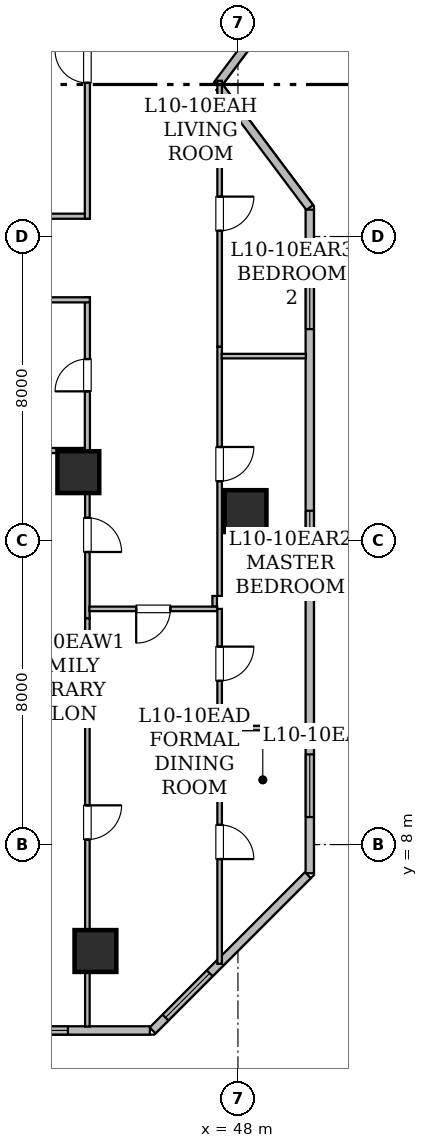
"""IFC4 building model, lengths in metres.
Left out: names, types, materials, properties, quantities, classifications, styles, units other than length and angle.
Written with IfcOpenShell. Run it as: python <this file> out.ifc"""

import sys

from ifc_helpers import new_model, si_unit, direction, frame, frame_2d, origin, origin_2d, place, context, subcontext, project, spatial, rectangle, hollow_rectangle, extrude, element, fill, save


model = new_model("IFC4")
c1 = context("Model", 3, precision=1e-05, world=origin(), true_north=direction((0.0, 1.0)))
c2 = subcontext(c1, "Body", "Model", "MODEL_VIEW")
j1 = project(units=[si_unit("LENGTHUNIT", "METRE"), si_unit("PLANEANGLEUNIT", "RADIAN")], contexts=[c1])
p1 = place(None, origin())
s1 = spatial("IfcSite", under=j1, at=p1, CompositionType="ELEMENT")
p2 = place(p1, origin())
s2 = spatial("IfcBuilding", under=s1, at=p2, CompositionType="ELEMENT")
p3 = place(p2, frame((0.0, 0.0, 44.25)))
s3 = spatial("IfcBuildingStorey", under=s2, at=p3, CompositionType="ELEMENT", Elevation=44.25)
for number, where, z_axis, x_axis in (
    (1, (44.25, 5.2, 0.0), (0.0, 0.0, 1.0), (1.0, 0.0, 0.0)),
    (2, (48.2, 16.775, 0.0), (0.0, 0.0, 1.0), (1.0, 0.0, 0.0)),
    (3, (43.8, 17.8, 0.0), (0.0, 0.0, 1.0), (1.0, 0.0, 0.0)),
):
    element("IfcColumn", number, at=place(p3, frame(where, z_axis=z_axis, x_axis=x_axis)), inside=s3, PredefinedType="COLUMN", context=c2, shape_type="SweptSolid", body=[
        extrude(hollow_rectangle(XDim=1.1, YDim=1.1, WallThickness=0.055, at=origin_2d()), origin(), (0.0, 0.0, 1.0), 3.65),
    ])
p4 = place(p3, frame((49.856, 31.191, 0.0), z_axis=(0.0, 0.0, 1.0), x_axis=(-0.600137081448, -0.799897170561, 0.0)))
e4 = element("IfcWall", 4, at=p4, inside=s3, PredefinedType="STANDARD", context=c2, shape_type="SweptSolid", body=[
    extrude(rectangle(XDim=3.989, YDim=0.22, at=frame_2d((1.995, 0.0))), origin(), (0.0, 0.0, 1.0), 3.43),
])
p5 = place(p3, frame((47.519, 27.923, 0.0), z_axis=(0.0, 0.0, 1.0), x_axis=(0.600118645218, -0.799911002338, 0.0)))
e5 = element("IfcWall", 5, at=p5, inside=s3, PredefinedType="STANDARD", context=c2, shape_type="SweptSolid", body=[
    extrude(rectangle(XDim=3.951, YDim=0.22, at=frame_2d((1.975, 0.0))), origin(), (0.0, 0.0, 1.0), 3.43),
])
p6 = place(p3, frame((49.89, 24.707, 0.0), z_axis=(0.0, 0.0, 1.0), x_axis=(0.0, -1.0, 0.0)))
e6 = element("IfcWall", 6, at=p6, inside=s3, PredefinedType="STANDARD", context=c2, shape_type="SweptSolid", body=[
    extrude(rectangle(XDim=17.461, YDim=0.22, at=frame_2d((8.73, 0.0))), origin(), (0.0, 0.0, 1.0), 3.43),
])
p7 = place(p6, frame((14.333, 0.0, 0.85)))
e7 = element("IfcOpeningElement", 7, at=p7, cuts=e6, PredefinedType="OPENING", context=c2, shape_type="SweptSolid", body=[
    extrude(rectangle(XDim=1.65, YDim=1.55, at=frame_2d((0.825, 0.775))), frame((0.0, 0.12, 0.0), z_axis=(0.0, -1.0, 0.0), x_axis=(1.0, 0.0, 0.0)), (0.0, 0.0, 1.0), 0.24),
])
p8 = place(p6, frame((7.922, 0.0, 0.85)))
e8 = element("IfcOpeningElement", 8, at=p8, cuts=e6, PredefinedType="OPENING", context=c2, shape_type="SweptSolid", body=[
    extrude(rectangle(XDim=1.65, YDim=1.55, at=frame_2d((0.825, 0.775))), frame((0.0, 0.12, 0.0), z_axis=(0.0, -1.0, 0.0), x_axis=(1.0, 0.0, 0.0)), (0.0, 0.0, 1.0), 0.24),
])
p9 = place(p6, frame((1.494, 0.0, 0.85)))
e9 = element("IfcOpeningElement", 9, at=p9, cuts=e6, PredefinedType="OPENING", context=c2, shape_type="SweptSolid", body=[
    extrude(rectangle(XDim=1.65, YDim=1.55, at=frame_2d((0.825, 0.775))), frame((0.0, 0.12, 0.0), z_axis=(0.0, -1.0, 0.0), x_axis=(1.0, 0.0, 0.0)), (0.0, 0.0, 1.0), 0.24),
])
p10 = place(p3, frame((49.84, 7.196, 0.0), z_axis=(0.0, 0.0, 1.0), x_axis=(-0.707127905562, -0.70708565618, 0.0)))
e10 = element("IfcWall", 10, at=p10, inside=s3, PredefinedType="STANDARD", context=c2, shape_type="SweptSolid", body=[
    extrude(rectangle(XDim=5.779, YDim=0.22, at=frame_2d((2.889, 0.0))), origin(), (0.0, 0.0, 1.0), 3.43),
])
p11 = place(p10, frame((3.651, 0.0, 0.85)))
e11 = element("IfcOpeningElement", 11, at=p11, cuts=e10, PredefinedType="OPENING", context=c2, shape_type="SweptSolid", body=[
    extrude(rectangle(XDim=1.65, YDim=1.55, at=frame_2d((0.825, 0.775))), frame((0.0, 0.12, 0.0), z_axis=(0.0, -1.0, 0.0), x_axis=(1.0, 0.0, 0.0)), (0.0, 0.0, 1.0), 0.24),
])
p12 = place(p3, frame((45.683, 3.11, 0.0), z_axis=(0.0, 0.0, 1.0), x_axis=(-1.0, 0.0, 0.0)))
e12 = element("IfcWall", 12, at=p12, inside=s3, PredefinedType="STANDARD", context=c2, shape_type="SweptSolid", body=[
    extrude(rectangle(XDim=37.368, YDim=0.22, at=frame_2d((18.684, 0.0))), origin(), (0.0, 0.0, 1.0), 3.43),
])
p13 = place(p12, frame((14.508, 0.0, 0.85)))
e13 = element("IfcOpeningElement", 13, at=p13, cuts=e12, PredefinedType="OPENING", context=c2, shape_type="SweptSolid", body=[
    extrude(rectangle(XDim=1.65, YDim=1.55, at=frame_2d((0.825, 0.775))), frame((0.0, 0.12, 0.0), z_axis=(0.0, -1.0, 0.0), x_axis=(1.0, 0.0, 0.0)), (0.0, 0.0, 1.0), 0.24),
])
p14 = place(p12, frame((33.025, 0.0, 0.85)))
e14 = element("IfcOpeningElement", 14, at=p14, cuts=e12, PredefinedType="OPENING", context=c2, shape_type="SweptSolid", body=[
    extrude(rectangle(XDim=1.65, YDim=1.55, at=frame_2d((0.825, 0.775))), frame((0.0, 0.12, 0.0), z_axis=(0.0, -1.0, 0.0), x_axis=(1.0, 0.0, 0.0)), (0.0, 0.0, 1.0), 0.24),
])
p15 = place(p12, frame((24.713, 0.0, 0.8)))
e15 = element("IfcOpeningElement", 15, at=p15, cuts=e12, PredefinedType="OPENING", context=c2, shape_type="SweptSolid", body=[
    extrude(rectangle(XDim=1.2, YDim=1.5, at=frame_2d((0.6, 0.75))), frame((0.0, 0.12, 0.0), z_axis=(0.0, -1.0, 0.0), x_axis=(1.0, 0.0, 0.0)), (0.0, 0.0, 1.0), 0.24),
])
p16 = place(p12, frame((28.113, 0.0, 0.85)))
e16 = element("IfcOpeningElement", 16, at=p16, cuts=e12, PredefinedType="OPENING", context=c2, shape_type="SweptSolid", body=[
    extrude(rectangle(XDim=1.65, YDim=1.55, at=frame_2d((0.825, 0.775))), frame((0.0, 0.12, 0.0), z_axis=(0.0, -1.0, 0.0), x_axis=(1.0, 0.0, 0.0)), (0.0, 0.0, 1.0), 0.24),
])
p17 = place(p12, frame((20.863, 0.0, 0.85)))
e17 = element("IfcOpeningElement", 17, at=p17, cuts=e12, PredefinedType="OPENING", context=c2, shape_type="SweptSolid", body=[
    extrude(rectangle(XDim=1.65, YDim=1.55, at=frame_2d((0.825, 0.775))), frame((0.0, 0.12, 0.0), z_axis=(0.0, -1.0, 0.0), x_axis=(1.0, 0.0, 0.0)), (0.0, 0.0, 1.0), 0.24),
])
p18 = place(p12, frame((10.428, 0.0, 0.8)))
e18 = element("IfcOpeningElement", 18, at=p18, cuts=e12, PredefinedType="OPENING", context=c2, shape_type="SweptSolid", body=[
    extrude(rectangle(XDim=1.2, YDim=1.5, at=frame_2d((0.6, 0.75))), frame((0.0, 0.12, 0.0), z_axis=(0.0, -1.0, 0.0), x_axis=(1.0, 0.0, 0.0)), (0.0, 0.0, 1.0), 0.24),
])
p19 = place(p12, frame((6.453, 0.0, 0.85)))
e19 = element("IfcOpeningElement", 19, at=p19, cuts=e12, PredefinedType="OPENING", context=c2, shape_type="SweptSolid", body=[
    extrude(rectangle(XDim=1.65, YDim=1.55, at=frame_2d((0.825, 0.775))), frame((0.0, 0.12, 0.0), z_axis=(0.0, -1.0, 0.0), x_axis=(1.0, 0.0, 0.0)), (0.0, 0.0, 1.0), 0.24),
])
p20 = place(p12, frame((2.157, 0.0, 0.85)))
e20 = element("IfcOpeningElement", 20, at=p20, cuts=e12, PredefinedType="OPENING", context=c2, shape_type="SweptSolid", body=[
    extrude(rectangle(XDim=1.65, YDim=1.55, at=frame_2d((0.825, 0.775))), frame((0.0, 0.12, 0.0), z_axis=(0.0, -1.0, 0.0), x_axis=(1.0, 0.0, 0.0)), (0.0, 0.0, 1.0), 0.24),
])
p21 = place(p3, frame((44.038, 18.304, 0.0), z_axis=(0.0, 0.0, 1.0), x_axis=(0.0, -1.0, 0.0)))
e21 = element("IfcWall", 21, at=p21, inside=s3, PredefinedType="PARTITIONING", context=c2, shape_type="SweptSolid", body=[
    extrude(rectangle(XDim=4.351, YDim=0.12, at=frame_2d((2.176, 0.0))), origin(), (0.0, 0.0, 1.0), 2.647),
])
p22 = place(p21, frame((1.705, 0.0, 0.0)))
e22 = element("IfcOpeningElement", 22, at=p22, cuts=e21, PredefinedType="OPENING", context=c2, shape_type="SweptSolid", body=[
    extrude(rectangle(XDim=0.9, YDim=2.1, at=frame_2d((0.45, 1.05))), frame((0.0, 0.07, 0.0), z_axis=(0.0, -1.0, 0.0), x_axis=(1.0, 0.0, 0.0)), (0.0, 0.0, 1.0), 0.14),
])
p23 = place(p3, frame((44.038, 13.953, 0.0), z_axis=(0.0, 0.0, 1.0), x_axis=(0.0, -1.0, 0.0)))
e23 = element("IfcWall", 23, at=p23, inside=s3, PredefinedType="PARTITIONING", context=c2, shape_type="SweptSolid", body=[
    extrude(rectangle(XDim=10.741, YDim=0.12, at=frame_2d((5.371, 0.0))), origin(), (0.0, 0.0, 1.0), 2.647),
])
p24 = place(p23, frame((4.92, 0.0, 0.0)))
e24 = element("IfcOpeningElement", 24, at=p24, cuts=e23, PredefinedType="OPENING", context=c2, shape_type="SweptSolid", body=[
    extrude(rectangle(XDim=0.9, YDim=2.1, at=frame_2d((0.45, 1.05))), frame((0.0, 0.07, 0.0), z_axis=(0.0, -1.0, 0.0), x_axis=(1.0, 0.0, 0.0)), (0.0, 0.0, 1.0), 0.14),
])
p25 = place(p3, frame((41.432, 18.369, 0.0), z_axis=(0.0, 0.0, 1.0), x_axis=(1.0, 0.0, 0.0)))
e25 = element("IfcWall", 25, at=p25, inside=s3, PredefinedType="PARTITIONING", context=c2, shape_type="SweptSolid", body=[
    extrude(rectangle(XDim=2.541, YDim=0.135, at=frame_2d((1.271, 0.0))), origin(), (0.0, 0.0, 1.0), 2.647),
])
p26 = place(p3, frame((47.453, 14.202, 0.0), z_axis=(0.0, 0.0, 1.0), x_axis=(-1.0, 0.0, 0.0)))
e26 = element("IfcWall", 26, at=p26, inside=s3, PredefinedType="PARTITIONING", context=c2, shape_type="SweptSolid", body=[
    extrude(rectangle(XDim=3.361, YDim=0.12, at=frame_2d((1.68, 0.0))), origin(), (0.0, 0.0, 1.0), 2.647),
])
p27 = place(p26, frame((1.231, 0.0, 0.0)))
e27 = element("IfcOpeningElement", 27, at=p27, cuts=e26, PredefinedType="OPENING", context=c2, shape_type="SweptSolid", body=[
    extrude(rectangle(XDim=0.9, YDim=2.1, at=frame_2d((0.45, 1.05))), frame((0.0, 0.07, 0.0), z_axis=(0.0, -1.0, 0.0), x_axis=(1.0, 0.0, 0.0)), (0.0, 0.0, 1.0), 0.14),
])
p28 = place(p3, frame((47.388, 14.542, 0.0), z_axis=(0.0, 0.0, 1.0), x_axis=(0.0, -1.0, 0.0)))
e28 = element("IfcWall", 28, at=p28, inside=s3, PredefinedType="PARTITIONING", context=c2, shape_type="SweptSolid", body=[
    extrude(rectangle(XDim=0.275, YDim=0.12, at=frame_2d((0.137, 0.0))), origin(), (0.0, 0.0, 1.0), 2.803),
])
p29 = place(p3, frame((44.038, 18.304, 0.0), z_axis=(0.0, 0.0, 1.0), x_axis=(0.0, 1.0, 0.0)))
e29 = element("IfcWall", 29, at=p29, inside=s3, PredefinedType="PARTITIONING", context=c2, shape_type="SweptSolid", body=[
    extrude(rectangle(XDim=4.095, YDim=0.135, at=frame_2d((2.047, 0.0))), origin(), (0.0, 0.0, 1.0), 2.647),
])
p30 = place(p29, frame((1.622, 0.0, 0.0)))
e30 = element("IfcOpeningElement", 30, at=p30, cuts=e29, PredefinedType="OPENING", context=c2, shape_type="SweptSolid", body=[
    extrude(rectangle(XDim=0.85, YDim=2.1, at=frame_2d((0.425, 1.05))), frame((0.0, 0.077, 0.0), z_axis=(0.0, -1.0, 0.0), x_axis=(1.0, 0.0, 0.0)), (0.0, 0.0, 1.0), 0.155),
])
for number, where, z_axis, x_axis in (
    (31, (44.103, 22.334, 0.0), (0.0, 0.0, 1.0), (-1.0, 0.0, 0.0)),
    (32, (41.432, 24.534, 0.0), (0.0, 0.0, 1.0), (1.0, 0.0, 0.0)),
):
    element("IfcWall", number, at=place(p3, frame(where, z_axis=z_axis, x_axis=x_axis)), inside=s3, PredefinedType="PARTITIONING", context=c2, shape_type="SweptSolid", body=[
        extrude(rectangle(XDim=2.671, YDim=0.135, at=frame_2d((1.335, 0.0))), origin(), (0.0, 0.0, 1.0), 2.647),
    ])
p31 = place(p3, frame((44.038, 24.469, 0.0), z_axis=(0.0, 0.0, 1.0), x_axis=(0.0, 1.0, 0.0)))
e33 = element("IfcWall", 33, at=p31, inside=s3, PredefinedType="PARTITIONING", context=c2, shape_type="SweptSolid", body=[
    extrude(rectangle(XDim=7.999, YDim=0.135, at=frame_2d((4.0, 0.0))), origin(), (0.0, 0.0, 1.0), 2.647),
])
p32 = place(p31, frame((3.575, 0.0, 0.0)))
e34 = element("IfcOpeningElement", 34, at=p32, cuts=e33, PredefinedType="OPENING", context=c2, shape_type="SweptSolid", body=[
    extrude(rectangle(XDim=0.85, YDim=2.1, at=frame_2d((0.425, 1.05))), frame((0.0, 0.077, 0.0), z_axis=(0.0, -1.0, 0.0), x_axis=(1.0, 0.0, 0.0)), (0.0, 0.0, 1.0), 0.155),
])
p33 = place(p3, frame((47.518, 21.102, 0.0), z_axis=(0.0, 0.0, 1.0), x_axis=(0.0, -1.0, 0.0)))
e35 = element("IfcWall", 35, at=p33, inside=s3, PredefinedType="PARTITIONING", context=c2, shape_type="SweptSolid", body=[
    extrude(rectangle(XDim=6.56, YDim=0.12, at=frame_2d((3.28, 0.0))), origin(), (0.0, 0.0, 1.0), 2.647),
])
p34 = place(p33, frame((2.64, 0.0, 0.0)))
e36 = element("IfcOpeningElement", 36, at=p34, cuts=e35, PredefinedType="OPENING", context=c2, shape_type="SweptSolid", body=[
    extrude(rectangle(XDim=0.9, YDim=2.1, at=frame_2d((0.45, 1.05))), frame((0.0, 0.07, 0.0), z_axis=(0.0, -1.0, 0.0), x_axis=(1.0, 0.0, 0.0)), (0.0, 0.0, 1.0), 0.14),
])
p35 = place(p3, frame((47.518, 28.098, 0.0), z_axis=(0.0, 0.0, 1.0), x_axis=(0.0, -1.0, 0.0)))
e37 = element("IfcWall", 37, at=p35, inside=s3, PredefinedType="PARTITIONING", context=c2, shape_type="SweptSolid", body=[
    extrude(rectangle(XDim=6.996, YDim=0.12, at=frame_2d((3.498, 0.0))), origin(), (0.0, 0.0, 1.0), 2.957),
])
p36 = place(p35, frame((3.048, 0.0, 0.0)))
e38 = element("IfcOpeningElement", 38, at=p36, cuts=e37, PredefinedType="OPENING", context=c2, shape_type="SweptSolid", body=[
    extrude(rectangle(XDim=0.9, YDim=2.1, at=frame_2d((0.45, 1.05))), frame((0.0, 0.07, 0.0), z_axis=(0.0, -1.0, 0.0), x_axis=(1.0, 0.0, 0.0)), (0.0, 0.0, 1.0), 0.14),
])
p37 = place(p3, frame((47.518, 11.316, 0.0), z_axis=(0.0, 0.0, 1.0), x_axis=(0.0, -1.0, 0.0)))
e39 = element("IfcWall", 39, at=p37, inside=s3, PredefinedType="PARTITIONING", context=c2, shape_type="SweptSolid", body=[
    extrude(rectangle(XDim=6.453, YDim=0.12, at=frame_2d((3.227, 0.0))), origin(), (0.0, 0.0, 1.0), 3.43),
])
p38 = place(p37, frame((2.797, 0.0, 0.0)))
e40 = element("IfcOpeningElement", 40, at=p38, cuts=e39, PredefinedType="OPENING", context=c2, shape_type="SweptSolid", body=[
    extrude(rectangle(XDim=0.9, YDim=2.1, at=frame_2d((0.45, 1.05))), frame((0.0, 0.07, 0.0), z_axis=(0.0, -1.0, 0.0), x_axis=(1.0, 0.0, 0.0)), (0.0, 0.0, 1.0), 0.14),
])
p39 = place(p3, frame((47.518, 14.202, 0.0), z_axis=(0.0, 0.0, 1.0), x_axis=(0.0, -1.0, 0.0)))
e41 = element("IfcWall", 41, at=p39, inside=s3, PredefinedType="PARTITIONING", context=c2, shape_type="SweptSolid", body=[
    extrude(rectangle(XDim=2.886, YDim=0.12, at=frame_2d((1.443, 0.0))), origin(), (0.0, 0.0, 1.0), 2.803),
])
p40 = place(p39, frame((0.993, 0.0, 0.0)))
e42 = element("IfcOpeningElement", 42, at=p40, cuts=e41, PredefinedType="OPENING", context=c2, shape_type="SweptSolid", body=[
    extrude(rectangle(XDim=0.9, YDim=2.1, at=frame_2d((0.45, 1.05))), frame((0.0, 0.07, 0.0), z_axis=(0.0, -1.0, 0.0), x_axis=(1.0, 0.0, 0.0)), (0.0, 0.0, 1.0), 0.14),
])
p41 = place(p3, frame((47.572, 11.067, 0.0), z_axis=(0.0, 0.0, 1.0), x_axis=(1.0, 0.0, 0.0)))
e43 = element("IfcWall", 43, at=p41, inside=s3, PredefinedType="PARTITIONING", context=c2, shape_type="SweptSolid", body=[
    extrude(rectangle(XDim=2.216, YDim=0.12, at=frame_2d((1.108, 0.0))), origin(), (0.0, 0.0, 1.0), 3.43),
])
p42 = place(p3, frame((47.572, 20.853, 0.0), z_axis=(0.0, 0.0, 1.0), x_axis=(1.0, 0.0, 0.0)))
e44 = element("IfcWall", 44, at=p42, inside=s3, PredefinedType="PARTITIONING", context=c2, shape_type="SweptSolid", body=[
    extrude(rectangle(XDim=2.216, YDim=0.12, at=frame_2d((1.108, 0.0))), origin(), (0.0, 0.0, 1.0), 2.803),
])
p43 = place(p20, origin())
e45 = element("IfcWindow", 45, at=p43, inside=s3, PartitioningType="SINGLE_PANEL", PredefinedType="WINDOW", context=c2, shape_type="SweptSolid", body=[
    extrude(rectangle(XDim=1.65, YDim=1.55, at=frame_2d((0.825, 0.775))), frame((0.0, 0.03, 0.0), z_axis=(0.0, -1.0, 0.0), x_axis=(1.0, 0.0, 0.0)), (0.0, 0.0, 1.0), 0.06),
])
fill(e20, e45)
p44 = place(p11, origin())
e46 = element("IfcWindow", 46, at=p44, inside=s3, PartitioningType="SINGLE_PANEL", PredefinedType="WINDOW", context=c2, shape_type="SweptSolid", body=[
    extrude(rectangle(XDim=1.65, YDim=1.55, at=frame_2d((0.825, 0.775))), frame((0.0, 0.03, 0.0), z_axis=(0.0, -1.0, 0.0), x_axis=(1.0, 0.0, 0.0)), (0.0, 0.0, 1.0), 0.06),
])
fill(e11, e46)
p45 = place(p7, origin())
e47 = element("IfcWindow", 47, at=p45, inside=s3, PartitioningType="SINGLE_PANEL", PredefinedType="WINDOW", context=c2, shape_type="SweptSolid", body=[
    extrude(rectangle(XDim=1.65, YDim=1.55, at=frame_2d((0.825, 0.775))), frame((0.0, 0.03, 0.0), z_axis=(0.0, -1.0, 0.0), x_axis=(1.0, 0.0, 0.0)), (0.0, 0.0, 1.0), 0.06),
])
fill(e7, e47)
p46 = place(p8, origin())
e48 = element("IfcWindow", 48, at=p46, inside=s3, PartitioningType="SINGLE_PANEL", PredefinedType="WINDOW", context=c2, shape_type="SweptSolid", body=[
    extrude(rectangle(XDim=1.65, YDim=1.55, at=frame_2d((0.825, 0.775))), frame((0.0, 0.03, 0.0), z_axis=(0.0, -1.0, 0.0), x_axis=(1.0, 0.0, 0.0)), (0.0, 0.0, 1.0), 0.06),
])
fill(e8, e48)
p47 = place(p9, origin())
e49 = element("IfcWindow", 49, at=p47, inside=s3, PartitioningType="SINGLE_PANEL", PredefinedType="WINDOW", context=c2, shape_type="SweptSolid", body=[
    extrude(rectangle(XDim=1.65, YDim=1.55, at=frame_2d((0.825, 0.775))), frame((0.0, 0.03, 0.0), z_axis=(0.0, -1.0, 0.0), x_axis=(1.0, 0.0, 0.0)), (0.0, 0.0, 1.0), 0.06),
])
fill(e9, e49)
p48 = place(p22, origin())
e50 = element("IfcDoor", 50, at=p48, inside=s3, OperationType="SINGLE_SWING_RIGHT", PredefinedType="DOOR", context=c2, shape_type="SweptSolid", body=[
    extrude(rectangle(XDim=0.9, YDim=2.1, at=frame_2d((0.45, 1.05))), frame((0.0, 0.025, 0.0), z_axis=(0.0, -1.0, 0.0), x_axis=(1.0, 0.0, 0.0)), (0.0, 0.0, 1.0), 0.05),
])
fill(e22, e50)
p49 = place(p24, origin())
e51 = element("IfcDoor", 51, at=p49, inside=s3, OperationType="SINGLE_SWING_LEFT", PredefinedType="DOOR", context=c2, shape_type="SweptSolid", body=[
    extrude(rectangle(XDim=0.9, YDim=2.1, at=frame_2d((0.45, 1.05))), frame((0.0, 0.025, 0.0), z_axis=(0.0, -1.0, 0.0), x_axis=(1.0, 0.0, 0.0)), (0.0, 0.0, 1.0), 0.05),
])
fill(e24, e51)
p50 = place(p27, origin())
e52 = element("IfcDoor", 52, at=p50, inside=s3, OperationType="SINGLE_SWING_RIGHT", PredefinedType="DOOR", context=c2, shape_type="SweptSolid", body=[
    extrude(rectangle(XDim=0.9, YDim=2.1, at=frame_2d((0.45, 1.05))), frame((0.0, 0.025, 0.0), z_axis=(0.0, -1.0, 0.0), x_axis=(1.0, 0.0, 0.0)), (0.0, 0.0, 1.0), 0.05),
])
fill(e27, e52)
p51 = place(p30, origin())
e53 = element("IfcDoor", 53, at=p51, inside=s3, OperationType="SINGLE_SWING_LEFT", PredefinedType="DOOR", context=c2, shape_type="SweptSolid", body=[
    extrude(rectangle(XDim=0.85, YDim=2.1, at=frame_2d((0.425, 1.05))), frame((0.0, 0.025, 0.0), z_axis=(0.0, -1.0, 0.0), x_axis=(1.0, 0.0, 0.0)), (0.0, 0.0, 1.0), 0.05),
])
fill(e30, e53)
p52 = place(p32, origin())
e54 = element("IfcDoor", 54, at=p52, inside=s3, OperationType="SINGLE_SWING_RIGHT", PredefinedType="DOOR", context=c2, shape_type="SweptSolid", body=[
    extrude(rectangle(XDim=0.85, YDim=2.1, at=frame_2d((0.425, 1.05))), frame((0.0, 0.025, 0.0), z_axis=(0.0, -1.0, 0.0), x_axis=(1.0, 0.0, 0.0)), (0.0, 0.0, 1.0), 0.05),
])
fill(e34, e54)
p53 = place(p34, origin())
e55 = element("IfcDoor", 55, at=p53, inside=s3, OperationType="SINGLE_SWING_LEFT", PredefinedType="DOOR", context=c2, shape_type="SweptSolid", body=[
    extrude(rectangle(XDim=0.9, YDim=2.1, at=frame_2d((0.45, 1.05))), frame((0.0, 0.025, 0.0), z_axis=(0.0, -1.0, 0.0), x_axis=(1.0, 0.0, 0.0)), (0.0, 0.0, 1.0), 0.05),
])
fill(e36, e55)
p54 = place(p36, origin())
e56 = element("IfcDoor", 56, at=p54, inside=s3, OperationType="SINGLE_SWING_LEFT", PredefinedType="DOOR", context=c2, shape_type="SweptSolid", body=[
    extrude(rectangle(XDim=0.9, YDim=2.1, at=frame_2d((0.45, 1.05))), frame((0.0, 0.025, 0.0), z_axis=(0.0, -1.0, 0.0), x_axis=(1.0, 0.0, 0.0)), (0.0, 0.0, 1.0), 0.05),
])
fill(e38, e56)
p55 = place(p38, origin())
e57 = element("IfcDoor", 57, at=p55, inside=s3, OperationType="SINGLE_SWING_RIGHT", PredefinedType="DOOR", context=c2, shape_type="SweptSolid", body=[
    extrude(rectangle(XDim=0.9, YDim=2.1, at=frame_2d((0.45, 1.05))), frame((0.0, 0.025, 0.0), z_axis=(0.0, -1.0, 0.0), x_axis=(1.0, 0.0, 0.0)), (0.0, 0.0, 1.0), 0.05),
])
fill(e40, e57)
p56 = place(p40, origin())
e58 = element("IfcDoor", 58, at=p56, inside=s3, OperationType="SINGLE_SWING_LEFT", PredefinedType="DOOR", context=c2, shape_type="SweptSolid", body=[
    extrude(rectangle(XDim=0.9, YDim=2.1, at=frame_2d((0.45, 1.05))), frame((0.0, 0.025, 0.0), z_axis=(0.0, -1.0, 0.0), x_axis=(1.0, 0.0, 0.0)), (0.0, 0.0, 1.0), 0.05),
])
fill(e42, e58)
save(model, sys.argv[1])
